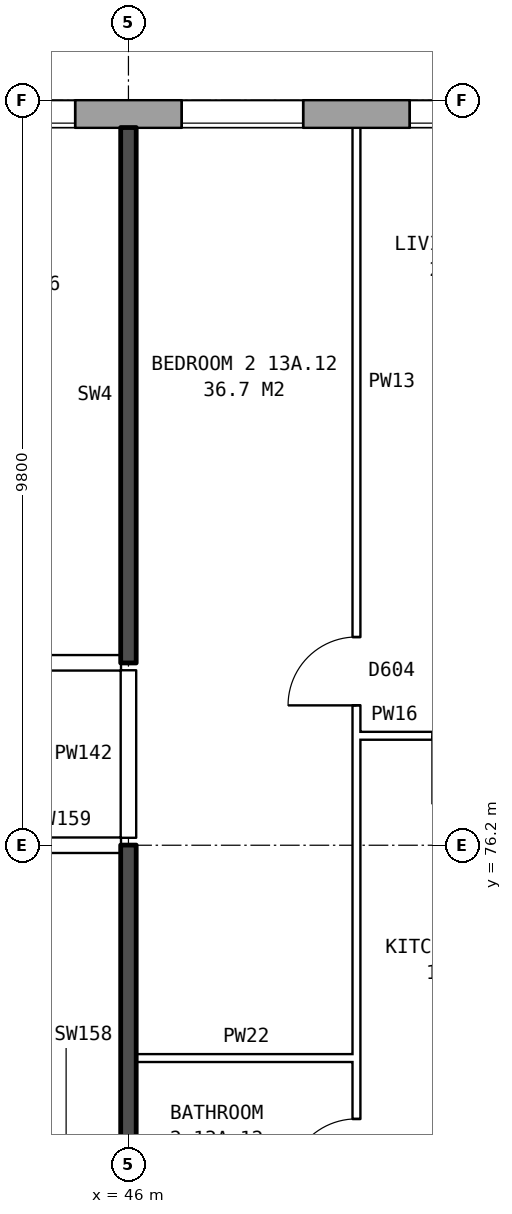
"""IFC4 building model, lengths in metres.
Left out: names, types, materials, properties, quantities, classifications, styles, units other than length and angle.
Written with IfcOpenShell. Run it as: python <this file> out.ifc"""

import sys

from ifc_helpers import new_model, si_unit, direction, frame, frame_2d, origin, place, context, subcontext, project, spatial, rectangle, extrude, element, fill, save


model = new_model("IFC4")
c1 = context("Model", 3, precision=1e-05, world=origin(), true_north=direction((0.0, 1.0)))
c2 = subcontext(c1, "Body", "Model", "MODEL_VIEW")
j1 = project(units=[si_unit("LENGTHUNIT", "METRE"), si_unit("PLANEANGLEUNIT", "RADIAN")], contexts=[c1])
p1 = place(None, origin())
s1 = spatial("IfcSite", under=j1, at=p1, CompositionType="ELEMENT")
p2 = place(p1, origin())
s2 = spatial("IfcBuilding", under=s1, at=p2, CompositionType="ELEMENT")
p3 = place(p2, frame((0.0, 0.0, 50.5)))
s3 = spatial("IfcBuildingStorey", under=s2, at=p3, CompositionType="ELEMENT", Elevation=50.5)
p4 = place(p3, frame((72.925, 85.82, 0.0), z_axis=(0.0, 0.0, 1.0), x_axis=(-1.0, 0.0, 0.0)))
e1 = element("IfcWall", 1, at=p4, inside=s3, PredefinedType="STANDARD", context=c2, shape_type="SweptSolid", body=[
    extrude(rectangle(XDim=48.351, YDim=0.36, at=frame_2d((24.175, 0.0))), origin(), (0.0, 0.0, 1.0), 2.85),
])
p5 = place(p4, frame((0.625, 0.0, 0.8)))
e2 = element("IfcOpeningElement", 2, at=p5, cuts=e1, PredefinedType="OPENING", context=c2, shape_type="SweptSolid", body=[
    extrude(rectangle(XDim=1.6, YDim=1.8, at=frame_2d((0.8, 0.9))), frame((0.0, 0.19, 0.0), z_axis=(0.0, -1.0, 0.0), x_axis=(1.0, 0.0, 0.0)), (0.0, 0.0, 1.0), 0.38),
])
p6 = place(p4, frame((3.625, 0.0, 0.8)))
e3 = element("IfcOpeningElement", 3, at=p6, cuts=e1, PredefinedType="OPENING", context=c2, shape_type="SweptSolid", body=[
    extrude(rectangle(XDim=1.6, YDim=1.8, at=frame_2d((0.8, 0.9))), frame((0.0, 0.19, 0.0), z_axis=(0.0, -1.0, 0.0), x_axis=(1.0, 0.0, 0.0)), (0.0, 0.0, 1.0), 0.38),
])
p7 = place(p4, frame((5.525, 0.0, 0.8)))
e4 = element("IfcOpeningElement", 4, at=p7, cuts=e1, PredefinedType="OPENING", context=c2, shape_type="SweptSolid", body=[
    extrude(rectangle(XDim=1.4, YDim=1.8, at=frame_2d((0.7, 0.9))), frame((0.0, 0.19, 0.0), z_axis=(0.0, -1.0, 0.0), x_axis=(1.0, 0.0, 0.0)), (0.0, 0.0, 1.0), 0.38),
])
p8 = place(p4, frame((9.225, 0.0, 0.45)))
e5 = element("IfcOpeningElement", 5, at=p8, cuts=e1, PredefinedType="OPENING", context=c2, shape_type="SweptSolid", body=[
    extrude(rectangle(XDim=1.0, YDim=0.9, at=frame_2d((0.5, 0.45))), frame((0.0, 0.19, 0.0), z_axis=(0.0, -1.0, 0.0), x_axis=(1.0, 0.0, 0.0)), (0.0, 0.0, 1.0), 0.38),
])
p9 = place(p4, frame((12.625, 0.0, 0.8)))
e6 = element("IfcOpeningElement", 6, at=p9, cuts=e1, PredefinedType="OPENING", context=c2, shape_type="SweptSolid", body=[
    extrude(rectangle(XDim=1.6, YDim=1.8, at=frame_2d((0.8, 0.9))), frame((0.0, 0.19, 0.0), z_axis=(0.0, -1.0, 0.0), x_axis=(1.0, 0.0, 0.0)), (0.0, 0.0, 1.0), 0.38),
])
p10 = place(p4, frame((15.625, 0.0, 0.8)))
e7 = element("IfcOpeningElement", 7, at=p10, cuts=e1, PredefinedType="OPENING", context=c2, shape_type="SweptSolid", body=[
    extrude(rectangle(XDim=1.6, YDim=1.8, at=frame_2d((0.8, 0.9))), frame((0.0, 0.19, 0.0), z_axis=(0.0, -1.0, 0.0), x_axis=(1.0, 0.0, 0.0)), (0.0, 0.0, 1.0), 0.38),
])
p11 = place(p4, frame((18.625, 0.0, 0.8)))
e8 = element("IfcOpeningElement", 8, at=p11, cuts=e1, PredefinedType="OPENING", context=c2, shape_type="SweptSolid", body=[
    extrude(rectangle(XDim=1.6, YDim=1.8, at=frame_2d((0.8, 0.9))), frame((0.0, 0.19, 0.0), z_axis=(0.0, -1.0, 0.0), x_axis=(1.0, 0.0, 0.0)), (0.0, 0.0, 1.0), 0.38),
])
p12 = place(p4, frame((21.625, 0.0, 0.8)))
e9 = element("IfcOpeningElement", 9, at=p12, cuts=e1, PredefinedType="OPENING", context=c2, shape_type="SweptSolid", body=[
    extrude(rectangle(XDim=1.6, YDim=1.8, at=frame_2d((0.8, 0.9))), frame((0.0, 0.19, 0.0), z_axis=(0.0, -1.0, 0.0), x_axis=(1.0, 0.0, 0.0)), (0.0, 0.0, 1.0), 0.38),
])
p13 = place(p4, frame((24.625, 0.0, 0.8)))
e10 = element("IfcOpeningElement", 10, at=p13, cuts=e1, PredefinedType="OPENING", context=c2, shape_type="SweptSolid", body=[
    extrude(rectangle(XDim=1.6, YDim=1.8, at=frame_2d((0.8, 0.9))), frame((0.0, 0.19, 0.0), z_axis=(0.0, -1.0, 0.0), x_axis=(1.0, 0.0, 0.0)), (0.0, 0.0, 1.0), 0.38),
])
p14 = place(p4, frame((27.625, 0.0, 0.8)))
e11 = element("IfcOpeningElement", 11, at=p14, cuts=e1, PredefinedType="OPENING", context=c2, shape_type="SweptSolid", body=[
    extrude(rectangle(XDim=1.6, YDim=1.8, at=frame_2d((0.8, 0.9))), frame((0.0, 0.19, 0.0), z_axis=(0.0, -1.0, 0.0), x_axis=(1.0, 0.0, 0.0)), (0.0, 0.0, 1.0), 0.38),
])
p15 = place(p4, frame((30.625, 0.0, 0.8)))
e12 = element("IfcOpeningElement", 12, at=p15, cuts=e1, PredefinedType="OPENING", context=c2, shape_type="SweptSolid", body=[
    extrude(rectangle(XDim=1.6, YDim=1.8, at=frame_2d((0.8, 0.9))), frame((0.0, 0.19, 0.0), z_axis=(0.0, -1.0, 0.0), x_axis=(1.0, 0.0, 0.0)), (0.0, 0.0, 1.0), 0.38),
])
p16 = place(p4, frame((33.625, 0.0, 0.8)))
e13 = element("IfcOpeningElement", 13, at=p16, cuts=e1, PredefinedType="OPENING", context=c2, shape_type="SweptSolid", body=[
    extrude(rectangle(XDim=1.6, YDim=1.8, at=frame_2d((0.8, 0.9))), frame((0.0, 0.19, 0.0), z_axis=(0.0, -1.0, 0.0), x_axis=(1.0, 0.0, 0.0)), (0.0, 0.0, 1.0), 0.38),
])
p17 = place(p4, frame((36.125, 0.0, 0.8)))
e14 = element("IfcOpeningElement", 14, at=p17, cuts=e1, PredefinedType="OPENING", context=c2, shape_type="SweptSolid", body=[
    extrude(rectangle(XDim=1.0, YDim=1.8, at=frame_2d((0.5, 0.9))), frame((0.0, 0.19, 0.0), z_axis=(0.0, -1.0, 0.0), x_axis=(1.0, 0.0, 0.0)), (0.0, 0.0, 1.0), 0.38),
])
p18 = place(p4, frame((39.975, 0.0, 1.7)))
e15 = element("IfcOpeningElement", 15, at=p18, cuts=e1, PredefinedType="OPENING", context=c2, shape_type="SweptSolid", body=[
    extrude(rectangle(XDim=1.0, YDim=0.9, at=frame_2d((0.5, 0.45))), frame((0.0, 0.19, 0.0), z_axis=(0.0, -1.0, 0.0), x_axis=(1.0, 0.0, 0.0)), (0.0, 0.0, 1.0), 0.38),
])
p19 = place(p4, frame((42.625, 0.0, 0.8)))
e16 = element("IfcOpeningElement", 16, at=p19, cuts=e1, PredefinedType="OPENING", context=c2, shape_type="SweptSolid", body=[
    extrude(rectangle(XDim=1.6, YDim=1.8, at=frame_2d((0.8, 0.9))), frame((0.0, 0.19, 0.0), z_axis=(0.0, -1.0, 0.0), x_axis=(1.0, 0.0, 0.0)), (0.0, 0.0, 1.0), 0.38),
])
p20 = place(p4, frame((45.625, 0.0, 0.8)))
e17 = element("IfcOpeningElement", 17, at=p20, cuts=e1, PredefinedType="OPENING", context=c2, shape_type="SweptSolid", body=[
    extrude(rectangle(XDim=1.6, YDim=1.8, at=frame_2d((0.8, 0.9))), frame((0.0, 0.19, 0.0), z_axis=(0.0, -1.0, 0.0), x_axis=(1.0, 0.0, 0.0)), (0.0, 0.0, 1.0), 0.38),
])
p21 = place(p4, frame((7.225, 0.0, 1.6)))
e18 = element("IfcOpeningElement", 18, at=p21, cuts=e1, PredefinedType="OPENING", context=c2, shape_type="SweptSolid", body=[
    extrude(rectangle(XDim=1.0, YDim=0.9, at=frame_2d((0.5, 0.45))), frame((0.0, 0.19, 0.0), z_axis=(0.0, -1.0, 0.0), x_axis=(1.0, 0.0, 0.0)), (0.0, 0.0, 1.0), 0.38),
])
p22 = place(p4, frame((10.575, 0.0, 0.45)))
e19 = element("IfcOpeningElement", 19, at=p22, cuts=e1, PredefinedType="OPENING", context=c2, shape_type="SweptSolid", body=[
    extrude(rectangle(XDim=1.2, YDim=1.8, at=frame_2d((0.6, 0.9))), frame((0.0, 0.19, 0.0), z_axis=(0.0, -1.0, 0.0), x_axis=(1.0, 0.0, 0.0)), (0.0, 0.0, 1.0), 0.38),
])
p23 = place(p4, frame((37.425, 0.0, 0.8)))
e20 = element("IfcOpeningElement", 20, at=p23, cuts=e1, PredefinedType="OPENING", context=c2, shape_type="SweptSolid", body=[
    extrude(rectangle(XDim=1.0, YDim=0.9, at=frame_2d((0.5, 0.45))), frame((0.0, 0.19, 0.0), z_axis=(0.0, -1.0, 0.0), x_axis=(1.0, 0.0, 0.0)), (0.0, 0.0, 1.0), 0.38),
])
p24 = place(p4, frame((41.275, 0.0, 0.8)))
e21 = element("IfcOpeningElement", 21, at=p24, cuts=e1, PredefinedType="OPENING", context=c2, shape_type="SweptSolid", body=[
    extrude(rectangle(XDim=1.0, YDim=1.8, at=frame_2d((0.5, 0.9))), frame((0.0, 0.19, 0.0), z_axis=(0.0, -1.0, 0.0), x_axis=(1.0, 0.0, 0.0)), (0.0, 0.0, 1.0), 0.38),
])
p25 = place(p3, frame((46.1, 73.4, 0.0), z_axis=(0.0, 0.0, 1.0), x_axis=(1.0, 0.0, 0.0)))
e22 = element("IfcWall", 22, at=p25, inside=s3, PredefinedType="PARTITIONING", context=c2, shape_type="SweptSolid", body=[
    extrude(rectangle(XDim=2.9, YDim=0.1, at=frame_2d((1.45, 0.0))), origin(), (0.0, 0.0, 1.0), 2.85),
])
p26 = place(p3, frame((44.36, 76.2, 0.0), z_axis=(0.0, 0.0, 1.0), x_axis=(1.0, 0.0, 0.0)))
e23 = element("IfcWall", 23, at=p26, inside=s3, PredefinedType="PARTITIONING", context=c2, shape_type="SweptSolid", body=[
    extrude(rectangle(XDim=1.54, YDim=0.2, at=frame_2d((0.77, 0.0))), origin(), (0.0, 0.0, 1.0), 2.85),
])
p27 = place(p3, frame((49.0, 77.64, 0.0), z_axis=(0.0, 0.0, 1.0), x_axis=(1.0, 0.0, 0.0)))
e24 = element("IfcWall", 24, at=p27, inside=s3, PredefinedType="PARTITIONING", context=c2, shape_type="SweptSolid", body=[
    extrude(rectangle(XDim=2.9, YDim=0.1, at=frame_2d((1.45, 0.0))), origin(), (0.0, 0.0, 1.0), 2.85),
])
p28 = place(p27, frame((1.0, 0.0, 0.0)))
e25 = element("IfcOpeningElement", 25, at=p28, cuts=e24, PredefinedType="OPENING", context=c2, shape_type="SweptSolid", body=[
    extrude(rectangle(XDim=0.9, YDim=2.1, at=frame_2d((0.45, 1.05))), frame((0.0, 0.06, 0.0), z_axis=(0.0, -1.0, 0.0), x_axis=(1.0, 0.0, 0.0)), (0.0, 0.0, 1.0), 0.12),
])
p29 = place(p3, frame((21.86, 78.6, 0.0), z_axis=(0.0, 0.0, 1.0), x_axis=(1.0, 0.0, 0.0)))
e26 = element("IfcWall", 26, at=p29, inside=s3, PredefinedType="PARTITIONING", context=c2, shape_type="SweptSolid", body=[
    extrude(rectangle(XDim=24.04, YDim=0.2, at=frame_2d((12.02, 0.0))), origin(), (0.0, 0.0, 1.0), 2.85),
])
p30 = place(p29, frame((20.59, 0.0, 0.0)))
e27 = element("IfcOpeningElement", 27, at=p30, cuts=e26, PredefinedType="OPENING", context=c2, shape_type="SweptSolid", body=[
    extrude(rectangle(XDim=1.0, YDim=2.1, at=frame_2d((0.5, 1.05))), frame((0.0, 0.11, 0.0), z_axis=(0.0, -1.0, 0.0), x_axis=(1.0, 0.0, 0.0)), (0.0, 0.0, 1.0), 0.22),
])
p31 = place(p29, frame((8.64, 0.0, 0.0)))
e28 = element("IfcOpeningElement", 28, at=p31, cuts=e26, PredefinedType="OPENING", context=c2, shape_type="SweptSolid", body=[
    extrude(rectangle(XDim=1.0, YDim=2.1, at=frame_2d((0.5, 1.05))), frame((0.0, 0.11, 0.0), z_axis=(0.0, -1.0, 0.0), x_axis=(1.0, 0.0, 0.0)), (0.0, 0.0, 1.0), 0.22),
])
p32 = place(p29, frame((1.37, 0.0, 0.0)))
e29 = element("IfcOpeningElement", 29, at=p32, cuts=e26, PredefinedType="OPENING", context=c2, shape_type="SweptSolid", body=[
    extrude(rectangle(XDim=1.0, YDim=2.1, at=frame_2d((0.5, 1.05))), frame((0.0, 0.11, 0.0), z_axis=(0.0, -1.0, 0.0), x_axis=(1.0, 0.0, 0.0)), (0.0, 0.0, 1.0), 0.22),
])
p33 = place(p3, frame((46.0, 71.2, 0.0), z_axis=(0.0, 0.0, 1.0), x_axis=(0.0, 1.0, 0.0)))
e30 = element("IfcWall", 30, at=p33, inside=s3, PredefinedType="SOLIDWALL", context=c2, shape_type="SweptSolid", body=[
    extrude(rectangle(XDim=5.0, YDim=0.2, at=frame_2d((2.5, 0.0))), origin(), (0.0, 0.0, 1.0), 2.85),
])
p34 = place(p3, frame((46.0, 76.3, 0.0), z_axis=(0.0, 0.0, 1.0), x_axis=(0.0, 1.0, 0.0)))
e31 = element("IfcWall", 31, at=p34, inside=s3, PredefinedType="PARTITIONING", context=c2, shape_type="SweptSolid", body=[
    extrude(rectangle(XDim=2.2, YDim=0.2, at=frame_2d((1.1, 0.0))), origin(), (0.0, 0.0, 1.0), 2.85),
])
p35 = place(p3, frame((46.0, 78.6, 0.0), z_axis=(0.0, 0.0, 1.0), x_axis=(0.0, 1.0, 0.0)))
e32 = element("IfcWall", 32, at=p35, inside=s3, PredefinedType="SOLIDWALL", context=c2, shape_type="SweptSolid", body=[
    extrude(rectangle(XDim=7.04, YDim=0.2, at=frame_2d((3.52, 0.0))), origin(), (0.0, 0.0, 1.0), 2.85),
])
p36 = place(p3, frame((49.0, 71.3, 0.0), z_axis=(0.0, 0.0, 1.0), x_axis=(0.0, 1.0, 0.0)))
e33 = element("IfcWall", 33, at=p36, inside=s3, PredefinedType="PARTITIONING", context=c2, shape_type="SweptSolid", body=[
    extrude(rectangle(XDim=14.34, YDim=0.1, at=frame_2d((7.17, 0.0))), origin(), (0.0, 0.0, 1.0), 2.85),
])
p37 = place(p36, frame((6.74, 0.0, 0.0)))
e34 = element("IfcOpeningElement", 34, at=p37, cuts=e33, PredefinedType="OPENING", context=c2, shape_type="SweptSolid", body=[
    extrude(rectangle(XDim=0.9, YDim=2.1, at=frame_2d((0.45, 1.05))), frame((0.0, 0.06, 0.0), z_axis=(0.0, -1.0, 0.0), x_axis=(1.0, 0.0, 0.0)), (0.0, 0.0, 1.0), 0.12),
])
p38 = place(p36, frame((0.4, 0.0, 0.0)))
e35 = element("IfcOpeningElement", 35, at=p38, cuts=e33, PredefinedType="OPENING", context=c2, shape_type="SweptSolid", body=[
    extrude(rectangle(XDim=0.9, YDim=2.1, at=frame_2d((0.45, 1.05))), frame((0.0, 0.06, 0.0), z_axis=(0.0, -1.0, 0.0), x_axis=(1.0, 0.0, 0.0)), (0.0, 0.0, 1.0), 0.12),
])
p39 = place(p12, origin())
e36 = element("IfcWindow", 36, at=p39, inside=s3, PartitioningType="SINGLE_PANEL", PredefinedType="WINDOW", context=c2, shape_type="SweptSolid", body=[
    extrude(rectangle(XDim=1.6, YDim=1.8, at=frame_2d((0.8, 0.9))), frame((0.0, 0.15, 0.0), z_axis=(0.0, -1.0, 0.0), x_axis=(1.0, 0.0, 0.0)), (0.0, 0.0, 1.0), 0.06),
])
fill(e9, e36)
p40 = place(p13, origin())
e37 = element("IfcWindow", 37, at=p40, inside=s3, PartitioningType="SINGLE_PANEL", PredefinedType="WINDOW", context=c2, shape_type="SweptSolid", body=[
    extrude(rectangle(XDim=1.6, YDim=1.8, at=frame_2d((0.8, 0.9))), frame((0.0, 0.15, 0.0), z_axis=(0.0, -1.0, 0.0), x_axis=(1.0, 0.0, 0.0)), (0.0, 0.0, 1.0), 0.06),
])
fill(e10, e37)
p41 = place(p14, origin())
e38 = element("IfcWindow", 38, at=p41, inside=s3, PartitioningType="SINGLE_PANEL", PredefinedType="WINDOW", context=c2, shape_type="SweptSolid", body=[
    extrude(rectangle(XDim=1.6, YDim=1.8, at=frame_2d((0.8, 0.9))), frame((0.0, 0.15, 0.0), z_axis=(0.0, -1.0, 0.0), x_axis=(1.0, 0.0, 0.0)), (0.0, 0.0, 1.0), 0.06),
])
fill(e11, e38)
p42 = place(p37, origin())
e39 = element("IfcDoor", 39, at=p42, inside=s3, OperationType="SINGLE_SWING_LEFT", PredefinedType="DOOR", context=c2, shape_type="SweptSolid", body=[
    extrude(rectangle(XDim=0.9, YDim=2.1, at=frame_2d((0.45, 1.05))), frame((0.0, 0.025, 0.0), z_axis=(0.0, -1.0, 0.0), x_axis=(1.0, 0.0, 0.0)), (0.0, 0.0, 1.0), 0.05),
])
fill(e34, e39)
p43 = place(p38, origin())
e40 = element("IfcDoor", 40, at=p43, inside=s3, OperationType="SINGLE_SWING_LEFT", PredefinedType="DOOR", context=c2, shape_type="SweptSolid", body=[
    extrude(rectangle(XDim=0.9, YDim=2.1, at=frame_2d((0.45, 1.05))), frame((0.0, 0.025, 0.0), z_axis=(0.0, -1.0, 0.0), x_axis=(1.0, 0.0, 0.0)), (0.0, 0.0, 1.0), 0.05),
])
fill(e35, e40)
save(model, sys.argv[1])
